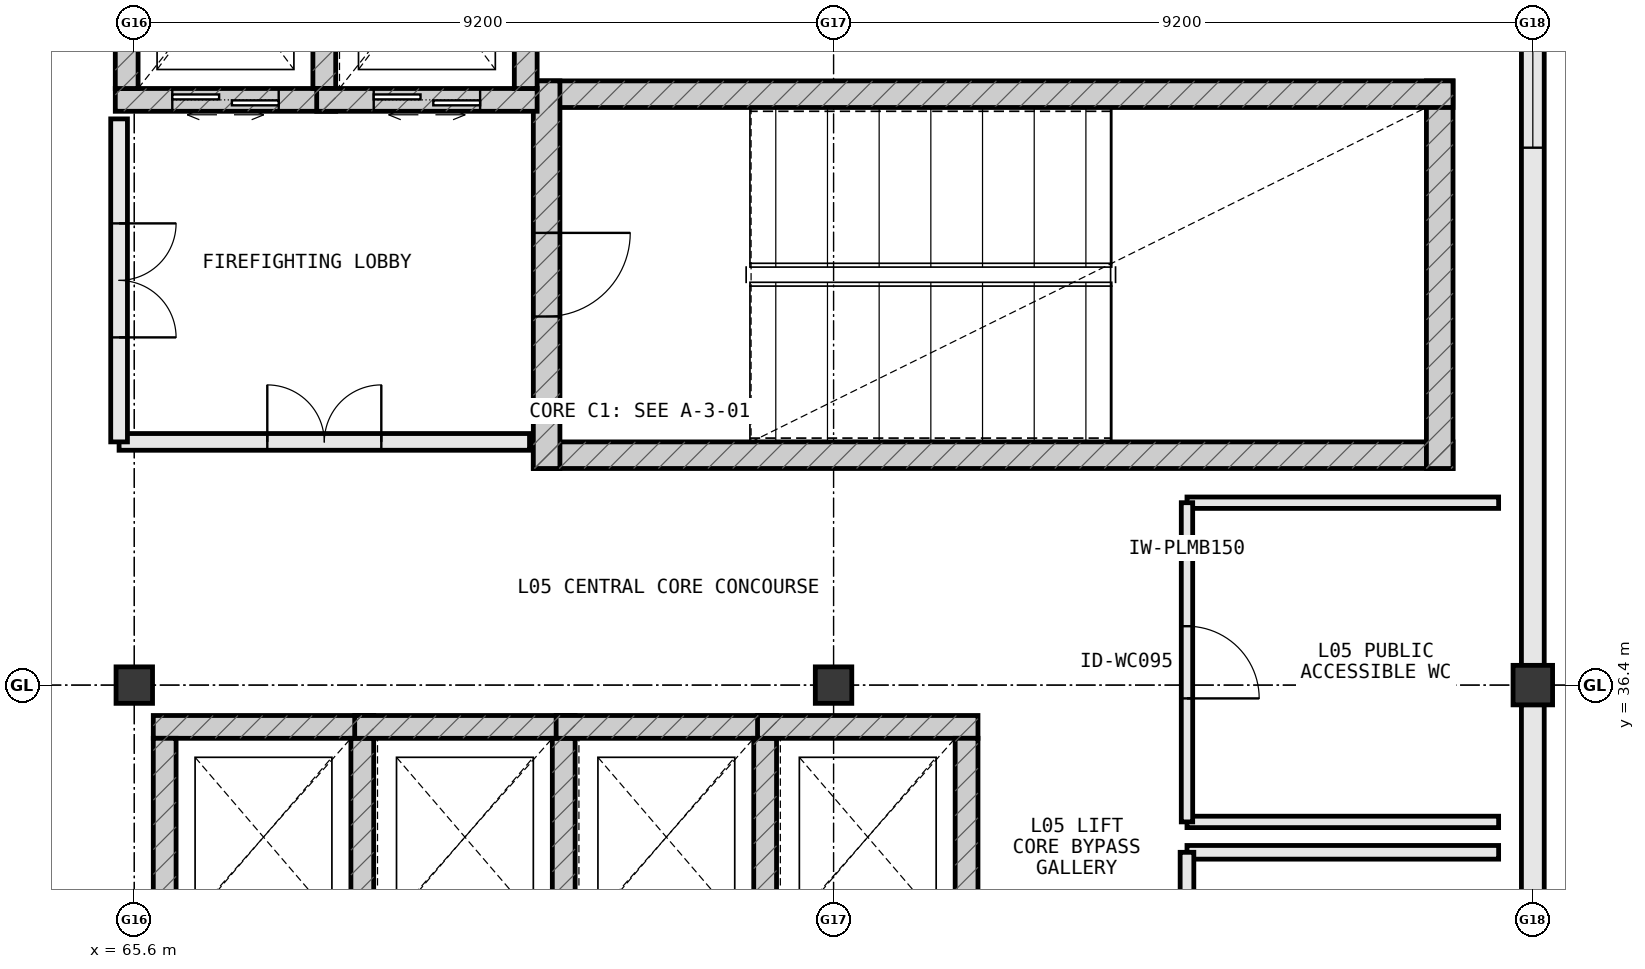
"""IFC4 building model, lengths in metres.
Left out: names, types, materials, properties, quantities, classifications, styles, units other than length and angle.
Written with IfcOpenShell. Run it as: python <this file> out.ifc"""

import sys

from ifc_helpers import new_model, si_unit, direction, frame, frame_2d, origin, origin_2d, place, context, subcontext, project, spatial, rectangle, extrude, element, fill, save


model = new_model("IFC4")
c1 = context("Model", 3, precision=1e-05, world=origin(), true_north=direction((0.0, 1.0)))
c2 = subcontext(c1, "Body", "Model", "MODEL_VIEW")
j1 = project(units=[si_unit("LENGTHUNIT", "METRE"), si_unit("PLANEANGLEUNIT", "RADIAN")], contexts=[c1])
p1 = place(None, origin())
s1 = spatial("IfcSite", under=j1, at=p1, CompositionType="ELEMENT")
p2 = place(p1, origin())
s2 = spatial("IfcBuilding", under=s1, at=p2, CompositionType="ELEMENT")
p3 = place(p2, frame((0.0, 0.0, 23.8)))
s3 = spatial("IfcBuildingStorey", under=s2, at=p3, CompositionType="ELEMENT", Elevation=23.8)
p4 = place(p3, frame((74.8, 36.4, 0.0), z_axis=(0.0, 0.0, 1.0), x_axis=(1.0, 0.0, 0.0)))
e1 = element("IfcColumn", 1, at=p4, inside=s3, PredefinedType="COLUMN", context=c2, shape_type="SweptSolid", body=[
    extrude(rectangle(XDim=0.48, YDim=0.48, at=origin_2d()), origin(), (0.0, 0.0, 1.0), 3.8),
])
p5 = place(p3, frame((84.0, 36.4, 0.0), z_axis=(0.0, 0.0, 1.0), x_axis=(1.0, 0.0, 0.0)))
e2 = element("IfcColumn", 2, at=p5, inside=s3, PredefinedType="COLUMN", context=c2, shape_type="SweptSolid", body=[
    extrude(rectangle(XDim=0.52, YDim=0.52, at=origin_2d()), origin(), (0.0, 0.0, 1.0), 3.8),
])
p6 = place(p3, frame((65.6, 36.4, 0.0), z_axis=(0.0, 0.0, 1.0), x_axis=(1.0, 0.0, 0.0)))
e3 = element("IfcColumn", 3, at=p6, inside=s3, PredefinedType="COLUMN", context=c2, shape_type="SweptSolid", body=[
    extrude(rectangle(XDim=0.48, YDim=0.48, at=origin_2d()), origin(), (0.0, 0.0, 1.0), 3.8),
])
p7 = place(p3, frame((84.0, 27.258, 0.0), z_axis=(0.0, 0.0, 1.0), x_axis=(0.0, 1.0, 0.0)))
e4 = element("IfcWall", 4, at=p7, inside=s3, PredefinedType="STANDARD", context=c2, shape_type="SweptSolid", body=[
    extrude(rectangle(XDim=8.884, YDim=0.3, at=frame_2d((4.442, 0.0))), origin(), (0.0, 0.0, 1.0), 2.965),
])
p8 = place(p7, frame((3.542, 0.0, 0.85)))
e5 = element("IfcOpeningElement", 5, at=p8, cuts=e4, PredefinedType="OPENING", context=c2, shape_type="SweptSolid", body=[
    extrude(rectangle(XDim=1.8, YDim=1.85, at=frame_2d((0.9, 0.925))), frame((0.0, 0.162, 0.0), z_axis=(0.0, -1.0, 0.0), x_axis=(1.0, 0.0, 0.0)), (0.0, 0.0, 1.0), 0.324),
])
p9 = place(p3, frame((84.0, 36.658, 0.0), z_axis=(0.0, 0.0, 1.0), x_axis=(0.0, 1.0, 0.0)))
e6 = element("IfcWall", 6, at=p9, inside=s3, PredefinedType="STANDARD", context=c2, shape_type="SweptSolid", body=[
    extrude(rectangle(XDim=10.284, YDim=0.3, at=frame_2d((5.142, 0.0))), origin(), (0.0, 0.0, 1.0), 2.965),
])
p10 = place(p9, frame((6.813, 0.0, 0.85)))
e7 = element("IfcOpeningElement", 7, at=p10, cuts=e6, PredefinedType="OPENING", context=c2, shape_type="SweptSolid", body=[
    extrude(rectangle(XDim=1.8, YDim=1.85, at=frame_2d((0.9, 0.925))), frame((0.0, 0.162, 0.0), z_axis=(0.0, -1.0, 0.0), x_axis=(1.0, 0.0, 0.0)), (0.0, 0.0, 1.0), 0.324),
])
p11 = place(p3, frame((70.85, 39.425, 0.0), z_axis=(0.0, 0.0, 1.0), x_axis=(1.0, 0.0, 0.0)))
e8 = element("IfcWall", 8, at=p11, inside=s3, PredefinedType="SHEAR", context=c2, shape_type="SweptSolid", body=[
    extrude(rectangle(XDim=12.1, YDim=0.35, at=frame_2d((6.05, 0.0))), origin(), (0.0, 0.0, 1.0), 3.8),
])
p12 = place(p3, frame((82.775, 39.25, 0.0), z_axis=(0.0, 0.0, 1.0), x_axis=(0.0, 1.0, 0.0)))
e9 = element("IfcWall", 9, at=p12, inside=s3, PredefinedType="SHEAR", context=c2, shape_type="SweptSolid", body=[
    extrude(rectangle(XDim=5.1, YDim=0.35, at=frame_2d((2.55, 0.0))), origin(), (0.0, 0.0, 1.0), 3.8),
])
p13 = place(p3, frame((82.95, 44.175, 0.0), z_axis=(0.0, 0.0, 1.0), x_axis=(-1.0, 0.0, 0.0)))
e10 = element("IfcWall", 10, at=p13, inside=s3, PredefinedType="SHEAR", context=c2, shape_type="SweptSolid", body=[
    extrude(rectangle(XDim=12.1, YDim=0.35, at=frame_2d((6.05, 0.0))), origin(), (0.0, 0.0, 1.0), 3.8),
])
p14 = place(p3, frame((71.025, 44.35, 0.0), z_axis=(0.0, 0.0, 1.0), x_axis=(0.0, -1.0, 0.0)))
e11 = element("IfcWall", 11, at=p14, inside=s3, PredefinedType="SHEAR", context=c2, shape_type="SweptSolid", body=[
    extrude(rectangle(XDim=5.1, YDim=0.35, at=frame_2d((2.55, 0.0))), origin(), (0.0, 0.0, 1.0), 3.8),
])
p15 = place(p14, frame((2.0, 0.0, 0.0)))
e12 = element("IfcOpeningElement", 12, at=p15, cuts=e11, PredefinedType="OPENING", context=c2, shape_type="SweptSolid", body=[
    extrude(rectangle(XDim=1.1, YDim=2.2, at=frame_2d((0.55, 1.1))), frame((0.0, 0.187, 0.0), z_axis=(0.0, -1.0, 0.0), x_axis=(1.0, 0.0, 0.0)), (0.0, 0.0, 1.0), 0.374),
])
p16 = place(p3, frame((65.35, 44.1, 0.0), z_axis=(0.0, 0.0, 1.0), x_axis=(1.0, 0.0, 0.0)))
e13 = element("IfcWall", 13, at=p16, inside=s3, PredefinedType="SHEAR", context=c2, shape_type="SweptSolid", body=[
    extrude(rectangle(XDim=2.9, YDim=0.3, at=frame_2d((1.45, 0.0))), origin(), (0.0, 0.0, 1.0), 3.8),
])
p17 = place(p16, frame((0.75, 0.0, 0.0)))
e14 = element("IfcOpeningElement", 14, at=p17, cuts=e13, PredefinedType="OPENING", context=c2, shape_type="SweptSolid", body=[
    extrude(rectangle(XDim=1.4, YDim=2.2, at=frame_2d((0.7, 1.1))), frame((0.0, 0.162, 0.0), z_axis=(0.0, -1.0, 0.0), x_axis=(1.0, 0.0, 0.0)), (0.0, 0.0, 1.0), 0.324),
])
for number, where, z_axis, x_axis in (
    (15, (68.1, 44.25, 0.0), (0.0, 0.0, 1.0), (0.0, 1.0, 0.0)),
    (16, (65.5, 47.15, 0.0), (0.0, 0.0, 1.0), (0.0, -1.0, 0.0)),
):
    element("IfcWall", number, at=place(p3, frame(where, z_axis=z_axis, x_axis=x_axis)), inside=s3, PredefinedType="SHEAR", context=c2, shape_type="SweptSolid", body=[
        extrude(rectangle(XDim=2.9, YDim=0.3, at=frame_2d((1.45, 0.0))), origin(), (0.0, 0.0, 1.0), 3.8),
    ])
p18 = place(p3, frame((68.0, 44.1, 0.0), z_axis=(0.0, 0.0, 1.0), x_axis=(1.0, 0.0, 0.0)))
e17 = element("IfcWall", 17, at=p18, inside=s3, PredefinedType="SHEAR", context=c2, shape_type="SweptSolid", body=[
    extrude(rectangle(XDim=2.9, YDim=0.3, at=frame_2d((1.45, 0.0))), origin(), (0.0, 0.0, 1.0), 3.8),
])
p19 = place(p18, frame((0.75, 0.0, 0.0)))
e18 = element("IfcOpeningElement", 18, at=p19, cuts=e17, PredefinedType="OPENING", context=c2, shape_type="SweptSolid", body=[
    extrude(rectangle(XDim=1.4, YDim=2.2, at=frame_2d((0.7, 1.1))), frame((0.0, 0.162, 0.0), z_axis=(0.0, -1.0, 0.0), x_axis=(1.0, 0.0, 0.0)), (0.0, 0.0, 1.0), 0.324),
])
for number, where, z_axis, x_axis in (
    (19, (70.75, 44.25, 0.0), (0.0, 0.0, 1.0), (0.0, 1.0, 0.0)),
    (20, (68.75, 35.85, 0.0), (0.0, 0.0, 1.0), (-1.0, 0.0, 0.0)),
):
    element("IfcWall", number, at=place(p3, frame(where, z_axis=z_axis, x_axis=x_axis)), inside=s3, PredefinedType="SHEAR", context=c2, shape_type="SweptSolid", body=[
        extrude(rectangle(XDim=2.9, YDim=0.3, at=frame_2d((1.45, 0.0))), origin(), (0.0, 0.0, 1.0), 3.8),
    ])
for number, where, z_axis, x_axis in (
    (21, (68.6, 33.1, 0.0), (0.0, 0.0, 1.0), (0.0, 1.0, 0.0)),
    (22, (66.0, 35.7, 0.0), (0.0, 0.0, 1.0), (0.0, -1.0, 0.0)),
):
    element("IfcWall", number, at=place(p3, frame(where, z_axis=z_axis, x_axis=x_axis)), inside=s3, PredefinedType="SHEAR", context=c2, shape_type="SweptSolid", body=[
        extrude(rectangle(XDim=2.6, YDim=0.3, at=frame_2d((1.3, 0.0))), origin(), (0.0, 0.0, 1.0), 3.8),
    ])
p20 = place(p3, frame((71.4, 35.85, 0.0), z_axis=(0.0, 0.0, 1.0), x_axis=(-1.0, 0.0, 0.0)))
e23 = element("IfcWall", 23, at=p20, inside=s3, PredefinedType="SHEAR", context=c2, shape_type="SweptSolid", body=[
    extrude(rectangle(XDim=2.9, YDim=0.3, at=frame_2d((1.45, 0.0))), origin(), (0.0, 0.0, 1.0), 3.8),
])
p21 = place(p3, frame((71.25, 33.1, 0.0), z_axis=(0.0, 0.0, 1.0), x_axis=(0.0, 1.0, 0.0)))
e24 = element("IfcWall", 24, at=p21, inside=s3, PredefinedType="SHEAR", context=c2, shape_type="SweptSolid", body=[
    extrude(rectangle(XDim=2.6, YDim=0.3, at=frame_2d((1.3, 0.0))), origin(), (0.0, 0.0, 1.0), 3.8),
])
p22 = place(p3, frame((74.05, 35.85, 0.0), z_axis=(0.0, 0.0, 1.0), x_axis=(-1.0, 0.0, 0.0)))
e25 = element("IfcWall", 25, at=p22, inside=s3, PredefinedType="SHEAR", context=c2, shape_type="SweptSolid", body=[
    extrude(rectangle(XDim=2.9, YDim=0.3, at=frame_2d((1.45, 0.0))), origin(), (0.0, 0.0, 1.0), 3.8),
])
p23 = place(p3, frame((73.9, 33.1, 0.0), z_axis=(0.0, 0.0, 1.0), x_axis=(0.0, 1.0, 0.0)))
e26 = element("IfcWall", 26, at=p23, inside=s3, PredefinedType="SHEAR", context=c2, shape_type="SweptSolid", body=[
    extrude(rectangle(XDim=2.6, YDim=0.3, at=frame_2d((1.3, 0.0))), origin(), (0.0, 0.0, 1.0), 3.8),
])
p24 = place(p3, frame((76.7, 35.85, 0.0), z_axis=(0.0, 0.0, 1.0), x_axis=(-1.0, 0.0, 0.0)))
e27 = element("IfcWall", 27, at=p24, inside=s3, PredefinedType="SHEAR", context=c2, shape_type="SweptSolid", body=[
    extrude(rectangle(XDim=2.9, YDim=0.3, at=frame_2d((1.45, 0.0))), origin(), (0.0, 0.0, 1.0), 3.8),
])
p25 = place(p3, frame((76.55, 33.1, 0.0), z_axis=(0.0, 0.0, 1.0), x_axis=(0.0, 1.0, 0.0)))
e28 = element("IfcWall", 28, at=p25, inside=s3, PredefinedType="SHEAR", context=c2, shape_type="SweptSolid", body=[
    extrude(rectangle(XDim=2.6, YDim=0.3, at=frame_2d((1.3, 0.0))), origin(), (0.0, 0.0, 1.0), 3.8),
])
p26 = place(p3, frame((65.4, 39.6, 0.0), z_axis=(0.0, 0.0, 1.0), x_axis=(1.0, 0.0, 0.0)))
e29 = element("IfcWall", 29, at=p26, inside=s3, PredefinedType="STANDARD", context=c2, shape_type="SweptSolid", body=[
    extrude(rectangle(XDim=5.4, YDim=0.22, at=frame_2d((2.7, 0.0))), origin(), (0.0, 0.0, 1.0), 3.55),
])
p27 = place(p26, frame((1.95, 0.0, 0.0)))
e30 = element("IfcOpeningElement", 30, at=p27, cuts=e29, PredefinedType="OPENING", context=c2, shape_type="SweptSolid", body=[
    extrude(rectangle(XDim=1.5, YDim=2.2, at=frame_2d((0.75, 1.1))), frame((0.0, 0.122, 0.0), z_axis=(0.0, -1.0, 0.0), x_axis=(1.0, 0.0, 0.0)), (0.0, 0.0, 1.0), 0.244),
])
p28 = place(p3, frame((65.4, 43.85, 0.0), z_axis=(0.0, 0.0, 1.0), x_axis=(0.0, -1.0, 0.0)))
e31 = element("IfcWall", 31, at=p28, inside=s3, PredefinedType="STANDARD", context=c2, shape_type="SweptSolid", body=[
    extrude(rectangle(XDim=4.25, YDim=0.22, at=frame_2d((2.125, 0.0))), origin(), (0.0, 0.0, 1.0), 3.55),
])
p29 = place(p28, frame((1.375, 0.0, 0.0)))
e32 = element("IfcOpeningElement", 32, at=p29, cuts=e31, PredefinedType="OPENING", context=c2, shape_type="SweptSolid", body=[
    extrude(rectangle(XDim=1.5, YDim=2.2, at=frame_2d((0.75, 1.1))), frame((0.0, 0.122, 0.0), z_axis=(0.0, -1.0, 0.0), x_axis=(1.0, 0.0, 0.0)), (0.0, 0.0, 1.0), 0.244),
])
p30 = place(p3, frame((83.55, 34.2, 0.0), z_axis=(0.0, 0.0, 1.0), x_axis=(-1.0, 0.0, 0.0)))
e33 = element("IfcWall", 33, at=p30, inside=s3, PredefinedType="PARTITIONING", context=c2, shape_type="SweptSolid", body=[
    extrude(rectangle(XDim=4.1, YDim=0.18, at=frame_2d((2.05, 0.0))), origin(), (0.0, 0.0, 1.0), 3.55),
])
p31 = place(p3, frame((79.45, 34.2, 0.0), z_axis=(0.0, 0.0, 1.0), x_axis=(0.0, -1.0, 0.0)))
e34 = element("IfcWall", 34, at=p31, inside=s3, PredefinedType="PARTITIONING", context=c2, shape_type="SweptSolid", body=[
    extrude(rectangle(XDim=4.4, YDim=0.18, at=frame_2d((2.2, 0.0))), origin(), (0.0, 0.0, 1.0), 3.55),
])
p32 = place(p31, frame((1.675, 0.0, 0.0)))
e35 = element("IfcOpeningElement", 35, at=p32, cuts=e34, PredefinedType="OPENING", context=c2, shape_type="SweptSolid", body=[
    extrude(rectangle(XDim=1.05, YDim=2.2, at=frame_2d((0.525, 1.1))), frame((0.0, 0.102, 0.0), z_axis=(0.0, -1.0, 0.0), x_axis=(1.0, 0.0, 0.0)), (0.0, 0.0, 1.0), 0.204),
])
for number, where, z_axis, x_axis in (
    (36, (79.45, 34.6, 0.0), (0.0, 0.0, 1.0), (1.0, 0.0, 0.0)),
    (37, (83.55, 38.8, 0.0), (0.0, 0.0, 1.0), (-1.0, 0.0, 0.0)),
):
    element("IfcWall", number, at=place(p3, frame(where, z_axis=z_axis, x_axis=x_axis)), inside=s3, PredefinedType="PLUMBINGWALL", context=c2, shape_type="SweptSolid", body=[
        extrude(rectangle(XDim=4.1, YDim=0.15, at=frame_2d((2.05, 0.0))), origin(), (0.0, 0.0, 1.0), 3.55),
    ])
p33 = place(p3, frame((79.45, 38.8, 0.0), z_axis=(0.0, 0.0, 1.0), x_axis=(0.0, -1.0, 0.0)))
e38 = element("IfcWall", 38, at=p33, inside=s3, PredefinedType="PLUMBINGWALL", context=c2, shape_type="SweptSolid", body=[
    extrude(rectangle(XDim=4.2, YDim=0.15, at=frame_2d((2.1, 0.0))), origin(), (0.0, 0.0, 1.0), 3.55),
])
p34 = place(p33, frame((1.625, 0.0, 0.0)))
e39 = element("IfcOpeningElement", 39, at=p34, cuts=e38, PredefinedType="OPENING", context=c2, shape_type="SweptSolid", body=[
    extrude(rectangle(XDim=0.95, YDim=2.15, at=frame_2d((0.475, 1.075))), frame((0.0, 0.087, 0.0), z_axis=(0.0, -1.0, 0.0), x_axis=(1.0, 0.0, 0.0)), (0.0, 0.0, 1.0), 0.174),
])
p35 = place(p10, origin())
e40 = element("IfcWindow", 40, at=p35, inside=s3, PartitioningType="SINGLE_PANEL", PredefinedType="WINDOW", context=c2, shape_type="SweptSolid", body=[
    extrude(rectangle(XDim=1.8, YDim=1.85, at=frame_2d((0.9, 0.925))), frame((0.0, 0.03, 0.0), z_axis=(0.0, -1.0, 0.0), x_axis=(1.0, 0.0, 0.0)), (0.0, 0.0, 1.0), 0.06),
])
fill(e7, e40)
p36 = place(p15, origin())
e41 = element("IfcDoor", 41, at=p36, inside=s3, OperationType="SINGLE_SWING_LEFT", PredefinedType="DOOR", context=c2, shape_type="SweptSolid", body=[
    extrude(rectangle(XDim=1.1, YDim=2.2, at=frame_2d((0.55, 1.1))), frame((0.0, 0.025, 0.0), z_axis=(0.0, -1.0, 0.0), x_axis=(1.0, 0.0, 0.0)), (0.0, 0.0, 1.0), 0.05),
])
fill(e12, e41)
p37 = place(p17, origin())
e42 = element("IfcDoor", 42, at=p37, inside=s3, OperationType="DOUBLE_DOOR_SLIDING", PredefinedType="DOOR", context=c2, shape_type="SweptSolid", body=[
    extrude(rectangle(XDim=1.4, YDim=2.2, at=frame_2d((0.7, 1.1))), frame((0.0, 0.025, 0.0), z_axis=(0.0, -1.0, 0.0), x_axis=(1.0, 0.0, 0.0)), (0.0, 0.0, 1.0), 0.05),
])
fill(e14, e42)
p38 = place(p19, origin())
e43 = element("IfcDoor", 43, at=p38, inside=s3, OperationType="DOUBLE_DOOR_SLIDING", PredefinedType="DOOR", context=c2, shape_type="SweptSolid", body=[
    extrude(rectangle(XDim=1.4, YDim=2.2, at=frame_2d((0.7, 1.1))), frame((0.0, 0.025, 0.0), z_axis=(0.0, -1.0, 0.0), x_axis=(1.0, 0.0, 0.0)), (0.0, 0.0, 1.0), 0.05),
])
fill(e18, e43)
p39 = place(p27, origin())
e44 = element("IfcDoor", 44, at=p39, inside=s3, OperationType="DOUBLE_DOOR_SINGLE_SWING", PredefinedType="DOOR", context=c2, shape_type="SweptSolid", body=[
    extrude(rectangle(XDim=1.5, YDim=2.2, at=frame_2d((0.75, 1.1))), frame((0.0, 0.025, 0.0), z_axis=(0.0, -1.0, 0.0), x_axis=(1.0, 0.0, 0.0)), (0.0, 0.0, 1.0), 0.05),
])
fill(e30, e44)
p40 = place(p29, origin())
e45 = element("IfcDoor", 45, at=p40, inside=s3, OperationType="DOUBLE_DOOR_SINGLE_SWING", PredefinedType="DOOR", context=c2, shape_type="SweptSolid", body=[
    extrude(rectangle(XDim=1.5, YDim=2.2, at=frame_2d((0.75, 1.1))), frame((0.0, 0.025, 0.0), z_axis=(0.0, -1.0, 0.0), x_axis=(1.0, 0.0, 0.0)), (0.0, 0.0, 1.0), 0.05),
])
fill(e32, e45)
p41 = place(p34, origin())
e46 = element("IfcDoor", 46, at=p41, inside=s3, OperationType="SINGLE_SWING_RIGHT", PredefinedType="DOOR", context=c2, shape_type="SweptSolid", body=[
    extrude(rectangle(XDim=0.95, YDim=2.15, at=frame_2d((0.475, 1.075))), frame((0.0, 0.025, 0.0), z_axis=(0.0, -1.0, 0.0), x_axis=(1.0, 0.0, 0.0)), (0.0, 0.0, 1.0), 0.05),
])
fill(e39, e46)
save(model, sys.argv[1])
